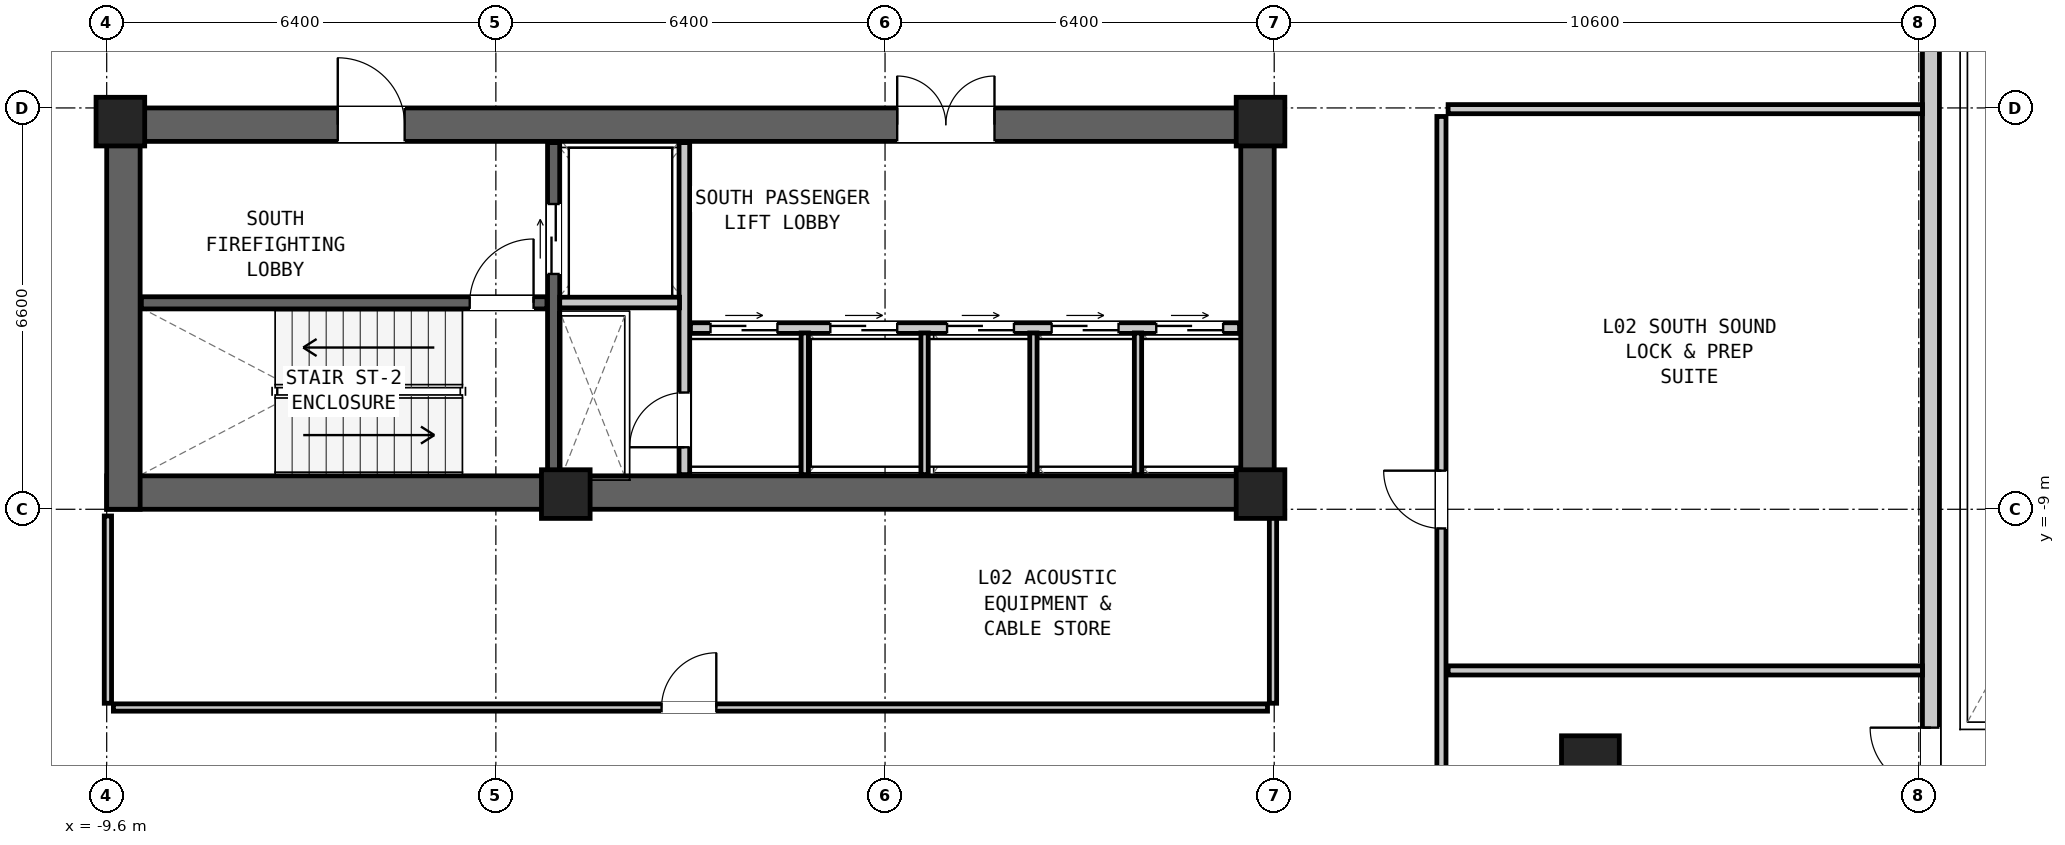
"""IFC4 building model, lengths in metres.
Left out: names, types, materials, properties, quantities, classifications, styles, units other than length and angle.
Written with IfcOpenShell. Run it as: python <this file> out.ifc"""

import sys

from ifc_helpers import new_model, si_unit, direction, frame, frame_2d, origin, origin_2d, place, context, subcontext, project, spatial, rectangle, hollow_rectangle, extrude, element, fill, save


model = new_model("IFC4")
c1 = context("Model", 3, precision=1e-05, world=origin(), true_north=direction((0.0, 1.0)))
c2 = subcontext(c1, "Body", "Model", "MODEL_VIEW")
j1 = project(units=[si_unit("LENGTHUNIT", "METRE"), si_unit("PLANEANGLEUNIT", "RADIAN")], contexts=[c1])
p1 = place(None, origin())
s1 = spatial("IfcSite", under=j1, at=p1, CompositionType="ELEMENT")
p2 = place(p1, origin())
s2 = spatial("IfcBuilding", under=s1, at=p2, CompositionType="ELEMENT")
p3 = place(p2, frame((0.0, 0.0, 9.3)))
s3 = spatial("IfcBuildingStorey", under=s2, at=p3, CompositionType="ELEMENT", Elevation=9.3)
p4 = place(p3, frame((-9.6, -8.725, 0.0), z_axis=(0.0, 0.0, 1.0), x_axis=(1.0, 0.0, 0.0)))
e1 = element("IfcWall", 1, at=p4, inside=s3, PredefinedType="SHEAR", context=c2, shape_type="SweptSolid", body=[
    extrude(rectangle(XDim=19.2, YDim=0.55, at=frame_2d((9.6, 0.0))), origin(), (0.0, 0.0, 1.0), 4.2),
])
p5 = place(p3, frame((-9.6, -2.675, 0.0), z_axis=(0.0, 0.0, 1.0), x_axis=(1.0, 0.0, 0.0)))
e2 = element("IfcWall", 2, at=p5, inside=s3, PredefinedType="SHEAR", context=c2, shape_type="SweptSolid", body=[
    extrude(rectangle(XDim=19.2, YDim=0.55, at=frame_2d((9.6, 0.0))), origin(), (0.0, 0.0, 1.0), 4.2),
])
p6 = place(p5, frame((3.8, 0.0, 0.0)))
e3 = element("IfcOpeningElement", 3, at=p6, cuts=e2, PredefinedType="OPENING", context=c2, shape_type="SweptSolid", body=[
    extrude(rectangle(XDim=1.1, YDim=2.08, at=frame_2d((0.55, 1.04))), frame((0.0, 0.287, 0.0), z_axis=(0.0, -1.0, 0.0), x_axis=(1.0, 0.0, 0.0)), (0.0, 0.0, 1.0), 0.574),
])
p7 = place(p5, frame((13.0, 0.0, 0.0)))
e4 = element("IfcOpeningElement", 4, at=p7, cuts=e2, PredefinedType="OPENING", context=c2, shape_type="SweptSolid", body=[
    extrude(rectangle(XDim=1.6, YDim=2.12, at=frame_2d((0.8, 1.06))), frame((0.0, 0.287, 0.0), z_axis=(0.0, -1.0, 0.0), x_axis=(1.0, 0.0, 0.0)), (0.0, 0.0, 1.0), 0.574),
])
for number, where, z_axis, x_axis in (
    (5, (-9.325, -9.0, 0.0), (0.0, 0.0, 1.0), (0.0, 1.0, 0.0)),
    (6, (9.325, -9.0, 0.0), (0.0, 0.0, 1.0), (0.0, 1.0, 0.0)),
):
    element("IfcWall", number, at=place(p3, frame(where, z_axis=z_axis, x_axis=x_axis)), inside=s3, PredefinedType="SHEAR", context=c2, shape_type="SweptSolid", body=[
        extrude(rectangle(XDim=6.6, YDim=0.55, at=frame_2d((3.3, 0.0))), origin(), (0.0, 0.0, 1.0), 4.2),
    ])
p8 = place(p3, frame((14.8, -13.2, 0.0), z_axis=(0.0, 0.0, 1.0), x_axis=(1.0, 0.0, 0.0)))
e7 = element("IfcColumn", 7, at=p8, inside=s3, PredefinedType="COLUMN", context=c2, shape_type="SweptSolid", body=[
    extrude(hollow_rectangle(XDim=0.95, YDim=0.95, WallThickness=0.06, at=origin_2d()), origin(), (0.0, 0.0, 1.0), 4.2),
])
for number, where, z_axis, x_axis in (
    (8, (-9.375, -2.625, 0.0), (0.0, 0.0, 1.0), (1.0, 0.0, 0.0)),
    (9, (9.375, -2.625, 0.0), (0.0, 0.0, 1.0), (1.0, 0.0, 0.0)),
    (10, (-2.05, -8.75, 0.0), (0.0, 0.0, 1.0), (1.0, 0.0, 0.0)),
    (11, (9.375, -8.75, 0.0), (0.0, 0.0, 1.0), (1.0, 0.0, 0.0)),
):
    element("IfcColumn", number, at=place(p3, frame(where, z_axis=z_axis, x_axis=x_axis)), inside=s3, PredefinedType="COLUMN", context=c2, shape_type="SweptSolid", body=[
        extrude(rectangle(XDim=0.8, YDim=0.8, at=origin_2d()), origin(), (0.0, 0.0, 1.0), 4.2),
    ])
p9 = place(p3, frame((-9.03, -5.605, 0.0), z_axis=(0.0, 0.0, 1.0), x_axis=(1.0, 0.0, 0.0)))
e12 = element("IfcWall", 12, at=p9, inside=s3, PredefinedType="SHEAR", context=c2, shape_type="SweptSolid", body=[
    extrude(rectangle(XDim=6.67, YDim=0.2, at=frame_2d((3.335, 0.0))), origin(), (0.0, 0.0, 1.0), 3.88),
])
p10 = place(p9, frame((5.4, 0.0, 0.0)))
e13 = element("IfcOpeningElement", 13, at=p10, cuts=e12, PredefinedType="OPENING", context=c2, shape_type="SweptSolid", body=[
    extrude(rectangle(XDim=1.05, YDim=2.08, at=frame_2d((0.525, 1.04))), frame((0.0, 0.112, 0.0), z_axis=(0.0, -1.0, 0.0), x_axis=(1.0, 0.0, 0.0)), (0.0, 0.0, 1.0), 0.224),
])
p11 = place(p3, frame((-2.25, -8.43, 0.0), z_axis=(0.0, 0.0, 1.0), x_axis=(0.0, 1.0, 0.0)))
e14 = element("IfcWall", 14, at=p11, inside=s3, PredefinedType="SHEAR", context=c2, shape_type="SweptSolid", body=[
    extrude(rectangle(XDim=5.46, YDim=0.2, at=frame_2d((2.73, 0.0))), origin(), (0.0, 0.0, 1.0), 3.88),
])
p12 = place(p11, frame((3.3, 0.0, 0.0)))
e15 = element("IfcOpeningElement", 15, at=p12, cuts=e14, PredefinedType="OPENING", context=c2, shape_type="SweptSolid", body=[
    extrude(rectangle(XDim=1.15, YDim=2.08, at=frame_2d((0.575, 1.04))), frame((0.0, 0.112, 0.0), z_axis=(0.0, -1.0, 0.0), x_axis=(1.0, 0.0, 0.0)), (0.0, 0.0, 1.0), 0.224),
])
p13 = place(p3, frame((-0.1, -8.43, 0.0), z_axis=(0.0, 0.0, 1.0), x_axis=(0.0, 1.0, 0.0)))
e16 = element("IfcWall", 16, at=p13, inside=s3, PredefinedType="PARTITIONING", context=c2, shape_type="SweptSolid", body=[
    extrude(rectangle(XDim=5.46, YDim=0.175, at=frame_2d((2.73, 0.0))), origin(), (0.0, 0.0, 1.0), 3.88),
])
p14 = place(p13, frame((0.45, 0.0, 0.0)))
e17 = element("IfcOpeningElement", 17, at=p14, cuts=e16, PredefinedType="OPENING", context=c2, shape_type="SweptSolid", body=[
    extrude(rectangle(XDim=0.9, YDim=2.05, at=frame_2d((0.45, 1.025))), frame((0.0, 0.1, 0.0), z_axis=(0.0, -1.0, 0.0), x_axis=(1.0, 0.0, 0.0)), (0.0, 0.0, 1.0), 0.199),
])
p15 = place(p3, frame((-2.15, -5.6, 0.0), z_axis=(0.0, 0.0, 1.0), x_axis=(1.0, 0.0, 0.0)))
e18 = element("IfcWall", 18, at=p15, inside=s3, PredefinedType="PARTITIONING", context=c2, shape_type="SweptSolid", body=[
    extrude(rectangle(XDim=1.97, YDim=0.175, at=frame_2d((0.985, 0.0))), origin(), (0.0, 0.0, 1.0), 3.88),
])
p16 = place(p3, frame((0.0, -6.02, 0.0), z_axis=(0.0, 0.0, 1.0), x_axis=(1.0, 0.0, 0.0)))
e19 = element("IfcWall", 19, at=p16, inside=s3, PredefinedType="PARTITIONING", context=c2, shape_type="SweptSolid", body=[
    extrude(rectangle(XDim=9.03, YDim=0.175, at=frame_2d((4.515, 0.0))), origin(), (0.0, 0.0, 1.0), 3.88),
])
p17 = place(p16, frame((0.33, 0.0, 0.0)))
e20 = element("IfcOpeningElement", 20, at=p17, cuts=e19, PredefinedType="OPENING", context=c2, shape_type="SweptSolid", body=[
    extrude(rectangle(XDim=1.1, YDim=2.06, at=frame_2d((0.55, 1.03))), frame((0.0, 0.1, 0.0), z_axis=(0.0, -1.0, 0.0), x_axis=(1.0, 0.0, 0.0)), (0.0, 0.0, 1.0), 0.199),
])
p18 = place(p16, frame((2.3, 0.0, 0.0)))
e21 = element("IfcOpeningElement", 21, at=p18, cuts=e19, PredefinedType="OPENING", context=c2, shape_type="SweptSolid", body=[
    extrude(rectangle(XDim=1.1, YDim=2.06, at=frame_2d((0.55, 1.03))), frame((0.0, 0.1, 0.0), z_axis=(0.0, -1.0, 0.0), x_axis=(1.0, 0.0, 0.0)), (0.0, 0.0, 1.0), 0.199),
])
p19 = place(p16, frame((4.22, 0.0, 0.0)))
e22 = element("IfcOpeningElement", 22, at=p19, cuts=e19, PredefinedType="OPENING", context=c2, shape_type="SweptSolid", body=[
    extrude(rectangle(XDim=1.1, YDim=2.06, at=frame_2d((0.55, 1.03))), frame((0.0, 0.1, 0.0), z_axis=(0.0, -1.0, 0.0), x_axis=(1.0, 0.0, 0.0)), (0.0, 0.0, 1.0), 0.199),
])
p20 = place(p16, frame((5.94, 0.0, 0.0)))
e23 = element("IfcOpeningElement", 23, at=p20, cuts=e19, PredefinedType="OPENING", context=c2, shape_type="SweptSolid", body=[
    extrude(rectangle(XDim=1.1, YDim=2.06, at=frame_2d((0.55, 1.03))), frame((0.0, 0.1, 0.0), z_axis=(0.0, -1.0, 0.0), x_axis=(1.0, 0.0, 0.0)), (0.0, 0.0, 1.0), 0.199),
])
p21 = place(p16, frame((7.66, 0.0, 0.0)))
e24 = element("IfcOpeningElement", 24, at=p21, cuts=e19, PredefinedType="OPENING", context=c2, shape_type="SweptSolid", body=[
    extrude(rectangle(XDim=1.1, YDim=2.06, at=frame_2d((0.55, 1.03))), frame((0.0, 0.1, 0.0), z_axis=(0.0, -1.0, 0.0), x_axis=(1.0, 0.0, 0.0)), (0.0, 0.0, 1.0), 0.199),
])
for number, where, z_axis, x_axis in (
    (25, (1.88, -8.43, 0.0), (0.0, 0.0, 1.0), (0.0, 1.0, 0.0)),
    (26, (3.85, -8.43, 0.0), (0.0, 0.0, 1.0), (0.0, 1.0, 0.0)),
    (27, (5.64, -8.43, 0.0), (0.0, 0.0, 1.0), (0.0, 1.0, 0.0)),
    (28, (7.36, -8.43, 0.0), (0.0, 0.0, 1.0), (0.0, 1.0, 0.0)),
):
    element("IfcWall", number, at=place(p3, frame(where, z_axis=z_axis, x_axis=x_axis)), inside=s3, PredefinedType="PARTITIONING", context=c2, shape_type="SweptSolid", body=[
        extrude(rectangle(XDim=2.33, YDim=0.12, at=frame_2d((1.165, 0.0))), origin(), (0.0, 0.0, 1.0), 3.88),
    ])
p22 = place(p3, frame((20.4, -25.74, 0.0), z_axis=(0.0, 0.0, 1.0), x_axis=(0.0, 1.0, 0.0)))
e29 = element("IfcWall", 29, at=p22, inside=s3, PredefinedType="MOVABLE", context=c2, shape_type="SweptSolid", body=[
    extrude(rectangle(XDim=51.48, YDim=0.28, at=frame_2d((25.74, 0.0))), origin(), (0.0, 0.0, 1.0), 2.933),
])
p23 = place(p22, frame((11.149, 0.0, 0.0)))
e30 = element("IfcOpeningElement", 30, at=p23, cuts=e29, PredefinedType="OPENING", context=c2, shape_type="SweptSolid", body=[
    extrude(rectangle(XDim=2.0, YDim=2.14, at=frame_2d((1.0, 1.07))), frame((0.0, 0.152, 0.0), z_axis=(0.0, -1.0, 0.0), x_axis=(1.0, 0.0, 0.0)), (0.0, 0.0, 1.0), 0.304),
])
p24 = place(p22, frame((38.64, 0.0, 0.0)))
e31 = element("IfcOpeningElement", 31, at=p24, cuts=e29, PredefinedType="OPENING", context=c2, shape_type="SweptSolid", body=[
    extrude(rectangle(XDim=2.0, YDim=2.14, at=frame_2d((1.0, 1.07))), frame((0.0, 0.152, 0.0), z_axis=(0.0, -1.0, 0.0), x_axis=(1.0, 0.0, 0.0)), (0.0, 0.0, 1.0), 0.304),
])
p25 = place(p3, frame((12.35, -15.14, 0.0), z_axis=(0.0, 0.0, 1.0), x_axis=(0.0, 1.0, 0.0)))
e32 = element("IfcWall", 32, at=p25, inside=s3, PredefinedType="PARTITIONING", context=c2, shape_type="SweptSolid", body=[
    extrude(rectangle(XDim=12.6, YDim=0.15, at=frame_2d((6.3, 0.0))), origin(), (0.0, 0.0, 1.0), 3.88),
])
p26 = place(p25, frame((5.825, 0.0, 0.0)))
e33 = element("IfcOpeningElement", 33, at=p26, cuts=e32, PredefinedType="OPENING", context=c2, shape_type="SweptSolid", body=[
    extrude(rectangle(XDim=0.95, YDim=2.1, at=frame_2d((0.475, 1.05))), frame((0.0, 0.087, 0.0), z_axis=(0.0, -1.0, 0.0), x_axis=(1.0, 0.0, 0.0)), (0.0, 0.0, 1.0), 0.174),
])
p27 = place(p3, frame((12.46, -2.42, 0.0), z_axis=(0.0, 0.0, 1.0), x_axis=(1.0, 0.0, 0.0)))
e34 = element("IfcWall", 34, at=p27, inside=s3, PredefinedType="PARTITIONING", context=c2, shape_type="SweptSolid", body=[
    extrude(rectangle(XDim=7.8, YDim=0.15, at=frame_2d((3.9, 0.0))), origin(), (0.0, 0.0, 1.0), 2.742),
])
p28 = place(p3, frame((-9.49, -12.26, 0.0), z_axis=(0.0, 0.0, 1.0), x_axis=(1.0, 0.0, 0.0)))
e35 = element("IfcWall", 35, at=p28, inside=s3, PredefinedType="PARTITIONING", context=c2, shape_type="SweptSolid", body=[
    extrude(rectangle(XDim=18.98, YDim=0.12, at=frame_2d((9.49, 0.0))), origin(), (0.0, 0.0, 1.0), 3.88),
])
p29 = place(p28, frame((9.015, 0.0, 0.0)))
e36 = element("IfcOpeningElement", 36, at=p29, cuts=e35, PredefinedType="OPENING", context=c2, shape_type="SweptSolid", body=[
    extrude(rectangle(XDim=0.9, YDim=2.05, at=frame_2d((0.45, 1.025))), frame((0.0, 0.072, 0.0), z_axis=(0.0, -1.0, 0.0), x_axis=(1.0, 0.0, 0.0)), (0.0, 0.0, 1.0), 0.144),
])
for number, where, z_axis, x_axis in (
    (37, (-9.58, -12.19, 0.0), (0.0, 0.0, 1.0), (0.0, 1.0, 0.0)),
    (38, (9.58, -12.19, 0.0), (0.0, 0.0, 1.0), (0.0, 1.0, 0.0)),
):
    element("IfcWall", number, at=place(p3, frame(where, z_axis=z_axis, x_axis=x_axis)), inside=s3, PredefinedType="PARTITIONING", context=c2, shape_type="SweptSolid", body=[
        extrude(rectangle(XDim=3.08, YDim=0.12, at=frame_2d((1.54, 0.0))), origin(), (0.0, 0.0, 1.0), 3.88),
    ])
p30 = place(p3, frame((12.46, -11.65, 0.0), z_axis=(0.0, 0.0, 1.0), x_axis=(1.0, 0.0, 0.0)))
e39 = element("IfcWall", 39, at=p30, inside=s3, PredefinedType="PARTITIONING", context=c2, shape_type="SweptSolid", body=[
    extrude(rectangle(XDim=7.8, YDim=0.15, at=frame_2d((3.9, 0.0))), origin(), (0.0, 0.0, 1.0), 3.88),
])
p31 = place(p10, origin())
e40 = element("IfcDoor", 40, at=p31, inside=s3, OperationType="SINGLE_SWING_RIGHT", PredefinedType="DOOR", context=c2, shape_type="SweptSolid", body=[
    extrude(rectangle(XDim=1.05, YDim=2.08, at=frame_2d((0.525, 1.04))), frame((0.0, 0.025, 0.0), z_axis=(0.0, -1.0, 0.0), x_axis=(1.0, 0.0, 0.0)), (0.0, 0.0, 1.0), 0.05),
])
fill(e13, e40)
p32 = place(p6, origin())
e41 = element("IfcDoor", 41, at=p32, inside=s3, OperationType="SINGLE_SWING_LEFT", PredefinedType="DOOR", context=c2, shape_type="SweptSolid", body=[
    extrude(rectangle(XDim=1.1, YDim=2.08, at=frame_2d((0.55, 1.04))), frame((0.0, 0.025, 0.0), z_axis=(0.0, -1.0, 0.0), x_axis=(1.0, 0.0, 0.0)), (0.0, 0.0, 1.0), 0.05),
])
fill(e3, e41)
p33 = place(p12, origin())
e42 = element("IfcDoor", 42, at=p33, inside=s3, OperationType="DOUBLE_DOOR_SLIDING", PredefinedType="DOOR", context=c2, shape_type="SweptSolid", body=[
    extrude(rectangle(XDim=1.15, YDim=2.08, at=frame_2d((0.575, 1.04))), frame((0.0, 0.025, 0.0), z_axis=(0.0, -1.0, 0.0), x_axis=(1.0, 0.0, 0.0)), (0.0, 0.0, 1.0), 0.05),
])
fill(e15, e42)
p34 = place(p14, origin())
e43 = element("IfcDoor", 43, at=p34, inside=s3, OperationType="SINGLE_SWING_LEFT", PredefinedType="DOOR", context=c2, shape_type="SweptSolid", body=[
    extrude(rectangle(XDim=0.9, YDim=2.05, at=frame_2d((0.45, 1.025))), frame((0.0, 0.025, 0.0), z_axis=(0.0, -1.0, 0.0), x_axis=(1.0, 0.0, 0.0)), (0.0, 0.0, 1.0), 0.05),
])
fill(e17, e43)
p35 = place(p7, origin())
e44 = element("IfcDoor", 44, at=p35, inside=s3, OperationType="DOUBLE_DOOR_SINGLE_SWING", PredefinedType="DOOR", context=c2, shape_type="SweptSolid", body=[
    extrude(rectangle(XDim=1.6, YDim=2.12, at=frame_2d((0.8, 1.06))), frame((0.0, 0.025, 0.0), z_axis=(0.0, -1.0, 0.0), x_axis=(1.0, 0.0, 0.0)), (0.0, 0.0, 1.0), 0.05),
])
fill(e4, e44)
p36 = place(p23, origin())
e45 = element("IfcDoor", 45, at=p36, inside=s3, OperationType="DOUBLE_DOOR_SINGLE_SWING", PredefinedType="DOOR", context=c2, shape_type="SweptSolid", body=[
    extrude(rectangle(XDim=2.0, YDim=2.14, at=frame_2d((1.0, 1.07))), frame((0.0, 0.025, 0.0), z_axis=(0.0, -1.0, 0.0), x_axis=(1.0, 0.0, 0.0)), (0.0, 0.0, 1.0), 0.05),
])
fill(e30, e45)
p37 = place(p26, origin())
e46 = element("IfcDoor", 46, at=p37, inside=s3, OperationType="SINGLE_SWING_RIGHT", PredefinedType="DOOR", context=c2, shape_type="SweptSolid", body=[
    extrude(rectangle(XDim=0.95, YDim=2.1, at=frame_2d((0.475, 1.05))), frame((0.0, 0.025, 0.0), z_axis=(0.0, -1.0, 0.0), x_axis=(1.0, 0.0, 0.0)), (0.0, 0.0, 1.0), 0.05),
])
fill(e33, e46)
p38 = place(p29, origin())
e47 = element("IfcDoor", 47, at=p38, inside=s3, OperationType="SINGLE_SWING_RIGHT", PredefinedType="DOOR", context=c2, shape_type="SweptSolid", body=[
    extrude(rectangle(XDim=0.9, YDim=2.05, at=frame_2d((0.45, 1.025))), frame((0.0, 0.025, 0.0), z_axis=(0.0, -1.0, 0.0), x_axis=(1.0, 0.0, 0.0)), (0.0, 0.0, 1.0), 0.05),
])
fill(e36, e47)
p39 = place(p17, origin())
e48 = element("IfcDoor", 48, at=p39, inside=s3, OperationType="DOUBLE_DOOR_SLIDING", PredefinedType="DOOR", context=c2, shape_type="SweptSolid", body=[
    extrude(rectangle(XDim=1.1, YDim=2.06, at=frame_2d((0.55, 1.03))), frame((0.0, 0.025, 0.0), z_axis=(0.0, -1.0, 0.0), x_axis=(1.0, 0.0, 0.0)), (0.0, 0.0, 1.0), 0.05),
])
fill(e20, e48)
p40 = place(p18, origin())
e49 = element("IfcDoor", 49, at=p40, inside=s3, OperationType="DOUBLE_DOOR_SLIDING", PredefinedType="DOOR", context=c2, shape_type="SweptSolid", body=[
    extrude(rectangle(XDim=1.1, YDim=2.06, at=frame_2d((0.55, 1.03))), frame((0.0, 0.025, 0.0), z_axis=(0.0, -1.0, 0.0), x_axis=(1.0, 0.0, 0.0)), (0.0, 0.0, 1.0), 0.05),
])
fill(e21, e49)
p41 = place(p19, origin())
e50 = element("IfcDoor", 50, at=p41, inside=s3, OperationType="DOUBLE_DOOR_SLIDING", PredefinedType="DOOR", context=c2, shape_type="SweptSolid", body=[
    extrude(rectangle(XDim=1.1, YDim=2.06, at=frame_2d((0.55, 1.03))), frame((0.0, 0.025, 0.0), z_axis=(0.0, -1.0, 0.0), x_axis=(1.0, 0.0, 0.0)), (0.0, 0.0, 1.0), 0.05),
])
fill(e22, e50)
p42 = place(p20, origin())
e51 = element("IfcDoor", 51, at=p42, inside=s3, OperationType="DOUBLE_DOOR_SLIDING", PredefinedType="DOOR", context=c2, shape_type="SweptSolid", body=[
    extrude(rectangle(XDim=1.1, YDim=2.06, at=frame_2d((0.55, 1.03))), frame((0.0, 0.025, 0.0), z_axis=(0.0, -1.0, 0.0), x_axis=(1.0, 0.0, 0.0)), (0.0, 0.0, 1.0), 0.05),
])
fill(e23, e51)
p43 = place(p21, origin())
e52 = element("IfcDoor", 52, at=p43, inside=s3, OperationType="DOUBLE_DOOR_SLIDING", PredefinedType="DOOR", context=c2, shape_type="SweptSolid", body=[
    extrude(rectangle(XDim=1.1, YDim=2.06, at=frame_2d((0.55, 1.03))), frame((0.0, 0.025, 0.0), z_axis=(0.0, -1.0, 0.0), x_axis=(1.0, 0.0, 0.0)), (0.0, 0.0, 1.0), 0.05),
])
fill(e24, e52)
save(model, sys.argv[1])
